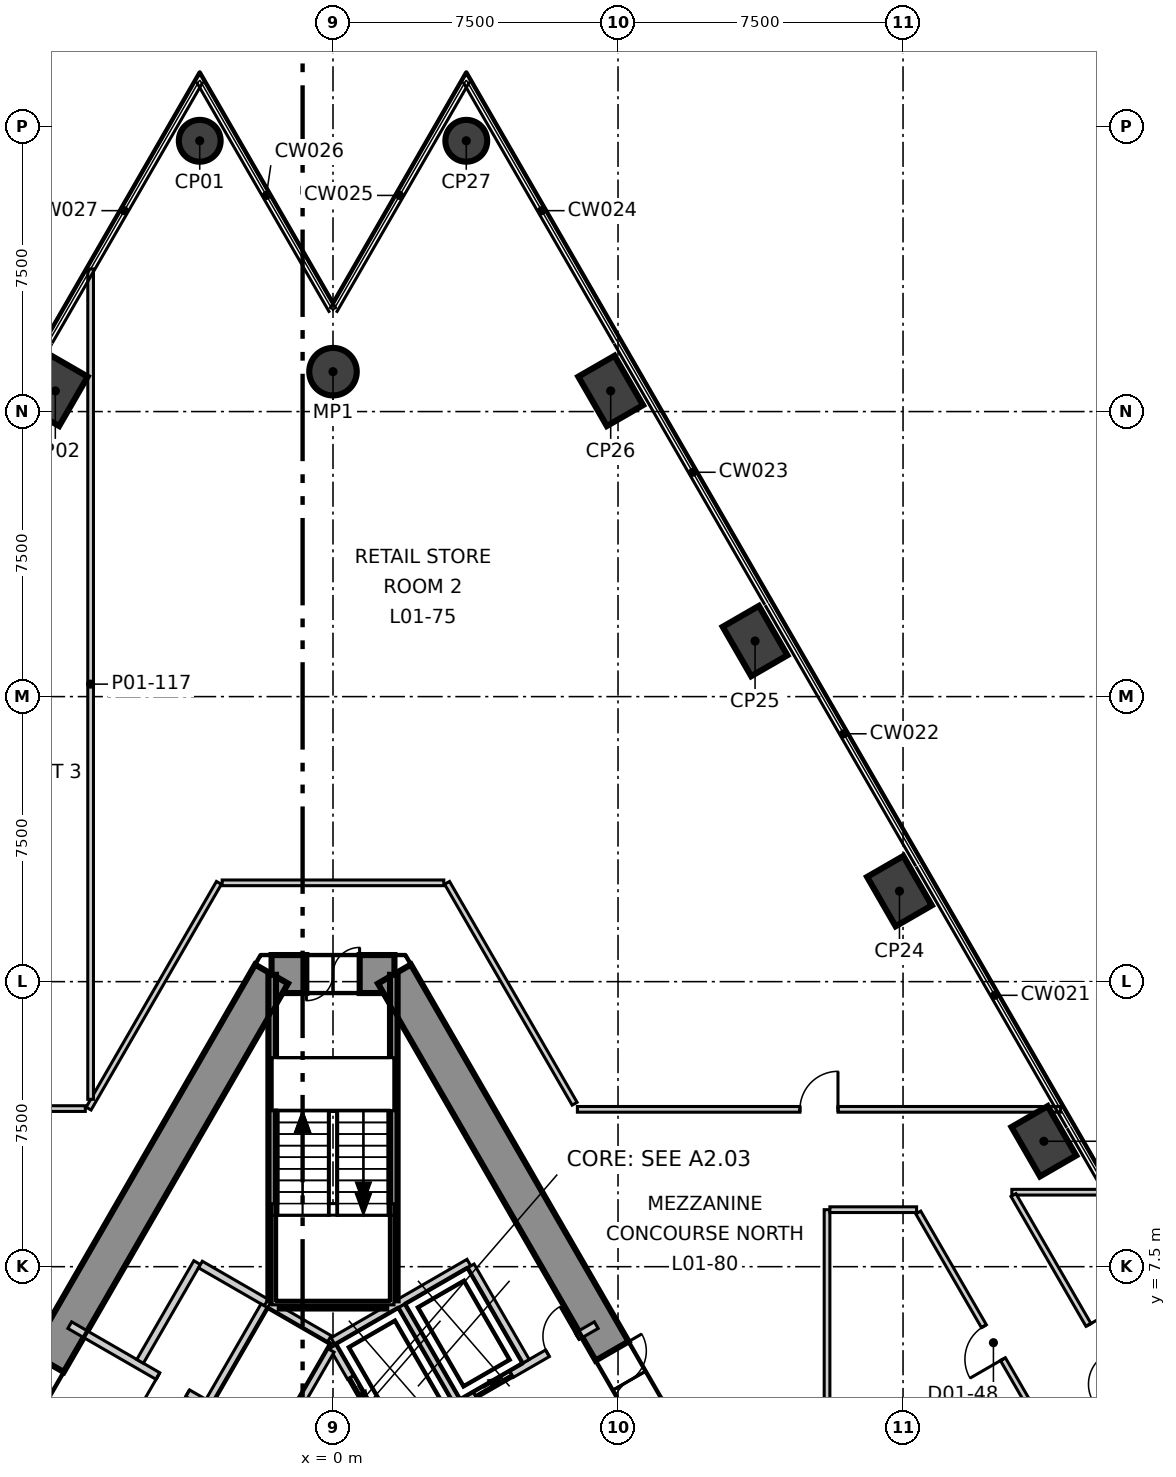
"""IFC4 building model, lengths in metres.
Left out: names, types, materials, properties, quantities, classifications, styles, units other than length and angle.
Written with IfcOpenShell. Run it as: python <this file> out.ifc"""

import sys

from ifc_helpers import new_model, si_unit, direction, frame, frame_2d, origin, origin_2d, place, context, subcontext, project, spatial, polyline, rectangle, circle, outline, extrude, element, fill, save


model = new_model("IFC4")
c1 = context("Model", 3, precision=1e-05, world=origin(), true_north=direction((0.0, 1.0)))
c2 = subcontext(c1, "Body", "Model", "MODEL_VIEW")
j1 = project(units=[si_unit("LENGTHUNIT", "METRE"), si_unit("PLANEANGLEUNIT", "RADIAN")], contexts=[c1])
p1 = place(None, origin())
s1 = spatial("IfcSite", under=j1, at=p1, CompositionType="ELEMENT")
p2 = place(p1, origin())
s2 = spatial("IfcBuilding", under=s1, at=p2, CompositionType="ELEMENT")
p3 = place(p2, frame((0.0, 0.0, 8.5)))
s3 = spatial("IfcBuildingStorey", under=s2, at=p3, CompositionType="ELEMENT", Elevation=8.5)
p4 = place(p3, frame((1.617, 15.2, -0.4), z_axis=(0.0, 0.0, 1.0), x_axis=(-1.0, 0.0, 0.0)))
e1 = element("IfcWall", 1, at=p4, inside=s3, PredefinedType="SHEAR", context=c2, shape_type="SweptSolid", body=[
    extrude(outline(polyline([(-0.288, -0.5), (1.617, -0.5), (3.522, -0.5), (2.945, 0.5), (1.617, 0.5), (0.289, 0.5), (-0.288, -0.5)])), origin(), (0.0, 0.0, 1.0), 6.0),
])
p5 = place(p4, frame((0.917, 0.0, 0.4)))
e2 = element("IfcOpeningElement", 2, at=p5, cuts=e1, PredefinedType="OPENING", context=c2, shape_type="SweptSolid", body=[
    extrude(rectangle(XDim=1.4, YDim=2.1, at=frame_2d((0.7, 1.05))), frame((0.0, 0.51, 0.0), z_axis=(0.0, -1.0, 0.0), x_axis=(1.0, 0.0, 0.0)), (0.0, 0.0, 1.0), 1.02),
])
p6 = place(p3, frame((-1.617, 15.2, -0.4), z_axis=(0.0, 0.0, 1.0), x_axis=(-0.499992141631, -0.866029940768, 0.0)))
e3 = element("IfcWall", 3, at=p6, inside=s3, PredefinedType="SHEAR", context=c2, shape_type="SweptSolid", body=[
    extrude(outline(polyline([(-0.289, -0.499), (1.656, -0.499), (3.601, -0.499), (5.547, -0.499), (7.492, -0.499), (9.437, -0.5), (11.382, -0.5), (13.328, -0.5), (15.273, -0.5), (17.218, -0.5), (19.163, -0.5), (21.109, -0.5), (23.054, -0.5), (24.999, -0.5), (24.422, 0.5), (22.566, 0.5), (20.709, 0.5), (18.853, 0.5), (16.997, 0.5), (15.14, 0.5), (13.284, 0.5), (11.427, 0.5), (9.571, 0.5), (7.715, 0.5), (5.858, 0.5), (4.002, 0.5), (2.146, 0.5), (0.289, 0.5), (-0.289, -0.499)])), origin(), (0.0, 0.0, 1.0), 6.0),
])
p7 = place(p6, frame((11.805, 0.0, 0.4)))
e4 = element("IfcOpeningElement", 4, at=p7, cuts=e3, PredefinedType="OPENING", context=c2, shape_type="SweptSolid", body=[
    extrude(rectangle(XDim=1.1, YDim=2.1, at=frame_2d((0.55, 1.05))), frame((0.0, 0.51, 0.0), z_axis=(0.0, -1.0, 0.0), x_axis=(1.0, 0.0, 0.0)), (0.0, 0.0, 1.0), 1.02),
])
p8 = place(p3, frame((13.972, -6.2, -0.4), z_axis=(0.0, 0.0, 1.0), x_axis=(-0.499992141631, 0.866029940768, 0.0)))
e5 = element("IfcWall", 5, at=p8, inside=s3, PredefinedType="SHEAR", context=c2, shape_type="SweptSolid", body=[
    extrude(outline(polyline([(-0.288, -0.5), (1.657, -0.5), (3.602, -0.5), (5.547, -0.5), (7.493, -0.5), (9.438, -0.5), (11.383, -0.5), (13.328, -0.5), (15.273, -0.5), (17.218, -0.499), (19.164, -0.499), (21.109, -0.499), (23.054, -0.499), (24.999, -0.499), (24.422, 0.5), (22.566, 0.5), (20.709, 0.5), (18.853, 0.5), (16.996, 0.5), (15.14, 0.5), (13.283, 0.5), (11.427, 0.5), (9.57, 0.5), (7.714, 0.5), (5.857, 0.5), (4.001, 0.5), (2.145, 0.5), (0.288, 0.5), (-0.288, -0.5)])), origin(), (0.0, 0.0, 1.0), 6.0),
])
p9 = place(p8, frame((11.455, 0.0, 0.4)))
e6 = element("IfcOpeningElement", 6, at=p9, cuts=e5, PredefinedType="OPENING", context=c2, shape_type="SweptSolid", body=[
    extrude(rectangle(XDim=1.8, YDim=2.1, at=frame_2d((0.9, 1.05))), frame((0.0, 0.51, 0.0), z_axis=(0.0, -1.0, 0.0), x_axis=(1.0, 0.0, 0.0)), (0.0, 0.0, 1.0), 1.02),
])
p10 = place(p3, frame((-3.507, 37.125, -0.4), z_axis=(0.0, 0.0, 1.0), x_axis=(0.5, 0.866025403784, 0.0)))
e7 = element("IfcColumn", 7, at=p10, inside=s3, PredefinedType="COLUMN", context=c2, shape_type="SweptSolid", body=[
    extrude(circle(Radius=0.55, at=origin_2d()), origin(), (0.0, 0.0, 1.0), 6.0),
])
for number, where, z_axis, x_axis in (
    (8, (-7.307, 30.544, -0.4), (0.0, 0.0, 1.0), (0.5, 0.866, 0.0)),
    (9, (18.706, 10.8, -0.4), (0.0, 0.0, 1.0), (-0.5, 0.866, 0.0)),
    (10, (14.906, 17.381, -0.4), (0.0, 0.0, 1.0), (-0.5, 0.866, 0.0)),
    (11, (11.106, 23.962, -0.4), (0.0, 0.0, 1.0), (-0.5, 0.866, 0.0)),
    (12, (7.307, 30.544, -0.4), (0.0, 0.0, 1.0), (-0.5, 0.866, 0.0)),
):
    element("IfcColumn", number, at=place(p3, frame(where, z_axis=z_axis, x_axis=x_axis)), inside=s3, PredefinedType="COLUMN", context=c2, shape_type="SweptSolid", body=[
        extrude(rectangle(XDim=1.5, YDim=1.1, at=origin_2d()), origin(), (0.0, 0.0, 1.0), 6.0),
    ])
p11 = place(p3, frame((3.507, 37.125, -0.4), z_axis=(0.0, 0.0, 1.0), x_axis=(-0.5, 0.866025403784, 0.0)))
e13 = element("IfcColumn", 13, at=p11, inside=s3, PredefinedType="COLUMN", context=c2, shape_type="SweptSolid", body=[
    extrude(circle(Radius=0.55, at=origin_2d()), origin(), (0.0, 0.0, 1.0), 6.0),
])
p12 = place(p3, frame((0.0, 31.05, -0.4), z_axis=(0.0, 0.0, 1.0), x_axis=(1.0, 0.0, 0.0)))
e14 = element("IfcColumn", 14, at=p12, inside=s3, PredefinedType="COLUMN", context=c2, shape_type="SweptSolid", body=[
    extrude(circle(Radius=0.625, at=origin_2d()), origin(), (0.0, 0.0, 1.0), 6.0),
])
p13 = place(p3, frame((17.863, 9.46, 0.0), z_axis=(0.0, 0.0, 1.0), x_axis=(1.0, 0.0, 0.0)))
e15 = element("IfcWall", 15, at=p13, inside=s3, PredefinedType="PARTITIONING", context=c2, shape_type="SweptSolid", body=[
    extrude(rectangle(XDim=2.54, YDim=0.15, at=frame_2d((1.27, 0.0))), origin(), (0.0, 0.0, 1.0), 5.6),
])
p14 = place(p3, frame((-6.431, 11.66, 0.0), z_axis=(0.0, 0.0, 1.0), x_axis=(0.499933006778, 0.866064078884, 0.0)))
e16 = element("IfcWall", 16, at=p14, inside=s3, PredefinedType="PARTITIONING", context=c2, shape_type="SweptSolid", body=[
    extrude(rectangle(XDim=6.859, YDim=0.15, at=frame_2d((3.429, 0.0))), origin(), (0.0, 0.0, 1.0), 5.6),
])
p15 = place(p3, frame((-10.6, 11.66, 0.0), z_axis=(0.0, 0.0, 1.0), x_axis=(1.0, 0.0, 0.0)))
e17 = element("IfcWall", 17, at=p15, inside=s3, PredefinedType="PARTITIONING", context=c2, shape_type="SweptSolid", body=[
    extrude(rectangle(XDim=4.082, YDim=0.15, at=frame_2d((2.041, 0.0))), origin(), (0.0, 0.0, 1.0), 5.6),
])
p16 = place(p15, frame((1.169, 0.0, 0.0)))
e18 = element("IfcOpeningElement", 18, at=p16, cuts=e17, PredefinedType="OPENING", context=c2, shape_type="SweptSolid", body=[
    extrude(rectangle(XDim=1.8, YDim=2.1, at=frame_2d((0.9, 1.05))), frame((0.0, 0.085, 0.0), z_axis=(0.0, -1.0, 0.0), x_axis=(1.0, 0.0, 0.0)), (0.0, 0.0, 1.0), 0.17),
])
p17 = place(p3, frame((-6.378, 11.904, 0.0), z_axis=(0.0, 0.0, 1.0), x_axis=(0.0, 1.0, 0.0)))
e19 = element("IfcWall", 19, at=p17, inside=s3, PredefinedType="PARTITIONING", context=c2, shape_type="SweptSolid", body=[
    extrude(rectangle(XDim=21.849, YDim=0.15, at=frame_2d((10.924, 0.0))), origin(), (0.0, 0.0, 1.0), 4.85),
])
p18 = place(p3, frame((6.431, 11.64, 0.0), z_axis=(0.0, 0.0, 1.0), x_axis=(1.0, 0.0, 0.0)))
e20 = element("IfcWall", 20, at=p18, inside=s3, PredefinedType="PARTITIONING", context=c2, shape_type="SweptSolid", body=[
    extrude(rectangle(XDim=12.714, YDim=0.15, at=frame_2d((6.357, 0.0))), origin(), (0.0, 0.0, 1.0), 5.6),
])
p19 = place(p18, frame((5.857, 0.0, 0.0)))
e21 = element("IfcOpeningElement", 21, at=p19, cuts=e20, PredefinedType="OPENING", context=c2, shape_type="SweptSolid", body=[
    extrude(rectangle(XDim=1.0, YDim=2.1, at=frame_2d((0.5, 1.05))), frame((0.0, 0.085, 0.0), z_axis=(0.0, -1.0, 0.0), x_axis=(1.0, 0.0, 0.0)), (0.0, 0.0, 1.0), 0.17),
])
p20 = place(p3, frame((3.002, 17.6, 0.0), z_axis=(0.0, 0.0, 1.0), x_axis=(0.500043638368, -0.866000207695, 0.0)))
e22 = element("IfcWall", 22, at=p20, inside=s3, PredefinedType="PARTITIONING", context=c2, shape_type="SweptSolid", body=[
    extrude(rectangle(XDim=6.711, YDim=0.15, at=frame_2d((3.356, 0.0))), origin(), (0.0, 0.0, 1.0), 5.6),
])
p21 = place(p3, frame((-2.916, 17.6, 0.0), z_axis=(0.0, 0.0, 1.0), x_axis=(1.0, 0.0, 0.0)))
e23 = element("IfcWall", 23, at=p21, inside=s3, PredefinedType="PARTITIONING", context=c2, shape_type="SweptSolid", body=[
    extrude(rectangle(XDim=5.832, YDim=0.15, at=frame_2d((2.916, 0.0))), origin(), (0.0, 0.0, 1.0), 5.6),
])
p22 = place(p3, frame((13.0, 2.0, 0.0), z_axis=(0.0, 0.0, 1.0), x_axis=(0.0, 1.0, 0.0)))
e24 = element("IfcWall", 24, at=p22, inside=s3, PredefinedType="PARTITIONING", context=c2, shape_type="SweptSolid", body=[
    extrude(rectangle(XDim=7.0, YDim=0.15, at=frame_2d((3.5, 0.0))), origin(), (0.0, 0.0, 1.0), 5.6),
])
p23 = place(p3, frame((17.906, 9.385, 0.0), z_axis=(0.0, 0.0, 1.0), x_axis=(0.500038545404, -0.866003148442, 0.0)))
e25 = element("IfcWall", 25, at=p23, inside=s3, PredefinedType="PARTITIONING", context=c2, shape_type="SweptSolid", body=[
    extrude(rectangle(XDim=11.299, YDim=0.15, at=frame_2d((5.649, 0.0))), origin(), (0.0, 0.0, 1.0), 5.6),
])
p24 = place(p23, frame((3.947, 0.0, 0.0)))
e26 = element("IfcOpeningElement", 26, at=p24, cuts=e25, PredefinedType="OPENING", context=c2, shape_type="SweptSolid", body=[
    extrude(rectangle(XDim=1.8, YDim=2.1, at=frame_2d((0.9, 1.05))), frame((0.0, 0.085, 0.0), z_axis=(0.0, -1.0, 0.0), x_axis=(1.0, 0.0, 0.0)), (0.0, 0.0, 1.0), 0.17),
])
p25 = place(p3, frame((13.075, 9.0, 0.0), z_axis=(0.0, 0.0, 1.0), x_axis=(1.0, 0.0, 0.0)))
e27 = element("IfcWall", 27, at=p25, inside=s3, PredefinedType="PARTITIONING", context=c2, shape_type="SweptSolid", body=[
    extrude(rectangle(XDim=2.282, YDim=0.15, at=frame_2d((1.141, 0.0))), origin(), (0.0, 0.0, 1.0), 5.6),
])
p26 = place(p3, frame((15.401, 8.925, 0.0), z_axis=(0.0, 0.0, 1.0), x_axis=(0.499987625769, -0.866032547932, 0.0)))
e28 = element("IfcWall", 28, at=p26, inside=s3, PredefinedType="PARTITIONING", context=c2, shape_type="SweptSolid", body=[
    extrude(rectangle(XDim=7.996, YDim=0.15, at=frame_2d((3.998, 0.0))), origin(), (0.0, 0.0, 1.0), 5.6),
])
p27 = place(p26, frame((3.455, 0.0, 0.0)))
e29 = element("IfcOpeningElement", 29, at=p27, cuts=e28, PredefinedType="OPENING", context=c2, shape_type="SweptSolid", body=[
    extrude(rectangle(XDim=1.0, YDim=2.1, at=frame_2d((0.5, 1.05))), frame((0.0, 0.085, 0.0), z_axis=(0.0, -1.0, 0.0), x_axis=(1.0, 0.0, 0.0)), (0.0, 0.0, 1.0), 0.17),
])
p28 = place(p3, frame((-0.002, 5.541, 0.0), z_axis=(0.0, 0.0, 1.0), x_axis=(0.86600155993, 0.500041296494, 0.0)))
e30 = element("IfcWall", 30, at=p28, inside=s3, PredefinedType="SOLIDWALL", context=c2, shape_type="SweptSolid", body=[
    extrude(rectangle(XDim=4.132, YDim=0.2, at=frame_2d((2.066, 0.0))), origin(), (0.0, 0.0, 1.0), 5.6),
])
p29 = place(p3, frame((0.0, 5.4, 0.0), z_axis=(0.0, 0.0, 1.0), x_axis=(0.500103862429, -0.865965430478, 0.0)))
e31 = element("IfcWall", 31, at=p29, inside=s3, PredefinedType="SOLIDWALL", context=c2, shape_type="SweptSolid", body=[
    extrude(rectangle(XDim=2.973, YDim=0.2, at=frame_2d((1.487, 0.0))), origin(), (0.0, 0.0, 1.0), 5.6),
])
p30 = place(p29, frame((0.937, 0.0, 0.0)))
e32 = element("IfcOpeningElement", 32, at=p30, cuts=e31, PredefinedType="OPENING", context=c2, shape_type="SweptSolid", body=[
    extrude(rectangle(XDim=1.1, YDim=2.1, at=frame_2d((0.55, 1.05))), frame((0.0, 0.11, 0.0), z_axis=(0.0, -1.0, 0.0), x_axis=(1.0, 0.0, 0.0)), (0.0, 0.0, 1.0), 0.22),
])
p31 = place(p3, frame((1.578, 2.874, 0.0), z_axis=(0.0, 0.0, 1.0), x_axis=(0.866055259465, 0.499948284879, 0.0)))
e33 = element("IfcWall", 33, at=p31, inside=s3, PredefinedType="SOLIDWALL", context=c2, shape_type="SweptSolid", body=[
    extrude(rectangle(XDim=6.177, YDim=0.2, at=frame_2d((3.088, 0.0))), origin(), (0.0, 0.0, 1.0), 5.6),
])
p32 = place(p31, frame((2.496, 0.0, 0.0)))
e34 = element("IfcOpeningElement", 34, at=p32, cuts=e33, PredefinedType="OPENING", context=c2, shape_type="SweptSolid", body=[
    extrude(rectangle(XDim=1.1, YDim=2.1, at=frame_2d((0.55, 1.05))), frame((0.0, 0.11, 0.0), z_axis=(0.0, -1.0, 0.0), x_axis=(1.0, 0.0, 0.0)), (0.0, 0.0, 1.0), 0.22),
])
p33 = place(p31, frame((4.696, 0.0, 0.0)))
e35 = element("IfcOpeningElement", 35, at=p33, cuts=e33, PredefinedType="OPENING", context=c2, shape_type="SweptSolid", body=[
    extrude(rectangle(XDim=0.9, YDim=2.1, at=frame_2d((0.45, 1.05))), frame((0.0, 0.11, 0.0), z_axis=(0.0, -1.0, 0.0), x_axis=(1.0, 0.0, 0.0)), (0.0, 0.0, 1.0), 0.22),
])
for number, where, z_axis, x_axis in (
    (36, (3.626, 7.52, 0.0), (0.0, 0.0, 1.0), (0.5, -0.866, 0.0)),
    (37, (1.807, 6.47, 0.0), (0.0, 0.0, 1.0), (0.5, -0.866, 0.0)),
):
    element("IfcWall", number, at=place(p3, frame(where, z_axis=z_axis, x_axis=x_axis)), inside=s3, PredefinedType="SOLIDWALL", context=c2, shape_type="SweptSolid", body=[
        extrude(rectangle(XDim=2.9, YDim=0.2, at=frame_2d((1.45, 0.0))), origin(), (0.0, 0.0, 1.0), 5.6),
    ])
p34 = place(p3, frame((-6.927, 5.962, 0.0), z_axis=(0.0, 0.0, 1.0), x_axis=(0.866065051207, -0.49993132236, 0.0)))
e38 = element("IfcWall", 38, at=p34, inside=s3, PredefinedType="SOLIDWALL", context=c2, shape_type="SweptSolid", body=[
    extrude(rectangle(XDim=4.182, YDim=0.2, at=frame_2d((2.091, 0.0))), origin(), (0.0, 0.0, 1.0), 5.6),
])
p35 = place(p34, frame((2.68, 0.0, 0.0)))
e39 = element("IfcOpeningElement", 39, at=p35, cuts=e38, PredefinedType="OPENING", context=c2, shape_type="SweptSolid", body=[
    extrude(rectangle(XDim=0.9, YDim=2.1, at=frame_2d((0.45, 1.05))), frame((0.0, 0.11, 0.0), z_axis=(0.0, -1.0, 0.0), x_axis=(1.0, 0.0, 0.0)), (0.0, 0.0, 1.0), 0.22),
])
p36 = place(p3, frame((-5.076, 5.009, 0.0), z_axis=(0.0, 0.0, 1.0), x_axis=(0.50002537861, 0.866010750942, 0.0)))
e40 = element("IfcWall", 40, at=p36, inside=s3, PredefinedType="SOLIDWALL", context=c2, shape_type="SweptSolid", body=[
    extrude(rectangle(XDim=3.0, YDim=0.2, at=frame_2d((1.5, 0.0))), origin(), (0.0, 0.0, 1.0), 5.6),
])
p37 = place(p3, frame((-3.489, 7.557, 0.0), z_axis=(0.0, 0.0, 1.0), x_axis=(0.866010750942, -0.50002537861, 0.0)))
e41 = element("IfcWall", 41, at=p37, inside=s3, PredefinedType="SOLIDWALL", context=c2, shape_type="SweptSolid", body=[
    extrude(rectangle(XDim=2.0, YDim=0.2, at=frame_2d((1.0, 0.0))), origin(), (0.0, 0.0, 1.0), 5.6),
])
p38 = place(p3, frame((-3.257, 3.959, 0.0), z_axis=(0.0, 0.0, 1.0), x_axis=(0.50012328804, 0.865954211699, 0.0)))
e42 = element("IfcWall", 42, at=p38, inside=s3, PredefinedType="SOLIDWALL", context=c2, shape_type="SweptSolid", body=[
    extrude(rectangle(XDim=2.9, YDim=0.2, at=frame_2d((1.45, 0.0))), origin(), (0.0, 0.0, 1.0), 5.6),
])
p39 = place(p3, frame((-1.67, 6.507, 0.0), z_axis=(0.0, 0.0, 1.0), x_axis=(0.865941441609, -0.500145398563, 0.0)))
e43 = element("IfcWall", 43, at=p39, inside=s3, PredefinedType="SOLIDWALL", context=c2, shape_type="SweptSolid", body=[
    extrude(rectangle(XDim=1.815, YDim=0.2, at=frame_2d((0.908, 0.0))), origin(), (0.0, 0.0, 1.0), 5.6),
])
p40 = place(p3, frame((-1.438, 2.909, 0.0), z_axis=(0.0, 0.0, 1.0), x_axis=(0.499829630636, 0.866123744241, 0.0)))
e44 = element("IfcWall", 44, at=p40, inside=s3, PredefinedType="SOLIDWALL", context=c2, shape_type="SweptSolid", body=[
    extrude(rectangle(XDim=2.761, YDim=0.2, at=frame_2d((1.38, 0.0))), origin(), (0.0, 0.0, 1.0), 5.6),
])
p41 = place(p3, frame((1.6, 6.615, 0.0), z_axis=(0.0, 0.0, 1.0), x_axis=(0.0, 1.0, 0.0)))
e45 = element("IfcWall", 45, at=p41, inside=s3, PredefinedType="SOLIDWALL", context=c2, shape_type="SweptSolid", body=[
    extrude(rectangle(XDim=8.565, YDim=0.2, at=frame_2d((4.282, 0.0))), origin(), (0.0, 0.0, 1.0), 5.6),
])
p42 = place(p3, frame((-1.4, 6.5, 0.0), z_axis=(0.0, 0.0, 1.0), x_axis=(1.0, 0.0, 0.0)))
e46 = element("IfcWall", 46, at=p42, inside=s3, PredefinedType="SOLIDWALL", context=c2, shape_type="SweptSolid", body=[
    extrude(rectangle(XDim=2.8, YDim=0.2, at=frame_2d((1.4, 0.0))), origin(), (0.0, 0.0, 1.0), 5.6),
])
p43 = place(p3, frame((-1.6, 6.615, 0.0), z_axis=(0.0, 0.0, 1.0), x_axis=(0.0, 1.0, 0.0)))
e47 = element("IfcWall", 47, at=p43, inside=s3, PredefinedType="SOLIDWALL", context=c2, shape_type="SweptSolid", body=[
    extrude(rectangle(XDim=8.565, YDim=0.2, at=frame_2d((4.282, 0.0))), origin(), (0.0, 0.0, 1.0), 5.6),
])
p44 = place(p30, origin())
e48 = element("IfcDoor", 48, at=p44, inside=s3, OperationType="SLIDING_TO_LEFT", PredefinedType="DOOR", context=c2, shape_type="SweptSolid", body=[
    extrude(rectangle(XDim=1.1, YDim=2.1, at=frame_2d((0.55, 1.05))), frame((0.0, 0.025, 0.0), z_axis=(0.0, -1.0, 0.0), x_axis=(1.0, 0.0, 0.0)), (0.0, 0.0, 1.0), 0.05),
])
fill(e32, e48)
p45 = place(p32, origin())
e49 = element("IfcDoor", 49, at=p45, inside=s3, OperationType="SLIDING_TO_LEFT", PredefinedType="DOOR", context=c2, shape_type="SweptSolid", body=[
    extrude(rectangle(XDim=1.1, YDim=2.1, at=frame_2d((0.55, 1.05))), frame((0.0, 0.025, 0.0), z_axis=(0.0, -1.0, 0.0), x_axis=(1.0, 0.0, 0.0)), (0.0, 0.0, 1.0), 0.05),
])
fill(e34, e49)
p46 = place(p35, origin())
e50 = element("IfcDoor", 50, at=p46, inside=s3, OperationType="SINGLE_SWING_LEFT", PredefinedType="DOOR", context=c2, shape_type="SweptSolid", body=[
    extrude(rectangle(XDim=0.9, YDim=2.1, at=frame_2d((0.45, 1.05))), frame((0.0, 0.025, 0.0), z_axis=(0.0, -1.0, 0.0), x_axis=(1.0, 0.0, 0.0)), (0.0, 0.0, 1.0), 0.05),
])
fill(e39, e50)
p47 = place(p27, origin())
e51 = element("IfcDoor", 51, at=p47, inside=s3, OperationType="SINGLE_SWING_RIGHT", PredefinedType="DOOR", context=c2, shape_type="SweptSolid", body=[
    extrude(rectangle(XDim=1.0, YDim=2.1, at=frame_2d((0.5, 1.05))), frame((0.0, 0.025, 0.0), z_axis=(0.0, -1.0, 0.0), x_axis=(1.0, 0.0, 0.0)), (0.0, 0.0, 1.0), 0.05),
])
fill(e29, e51)
p48 = place(p19, origin())
e52 = element("IfcDoor", 52, at=p48, inside=s3, OperationType="SINGLE_SWING_LEFT", PredefinedType="DOOR", context=c2, shape_type="SweptSolid", body=[
    extrude(rectangle(XDim=1.0, YDim=2.1, at=frame_2d((0.5, 1.05))), frame((0.0, 0.025, 0.0), z_axis=(0.0, -1.0, 0.0), x_axis=(1.0, 0.0, 0.0)), (0.0, 0.0, 1.0), 0.05),
])
fill(e21, e52)
p49 = place(p24, origin())
e53 = element("IfcDoor", 53, at=p49, inside=s3, OperationType="DOUBLE_DOOR_SINGLE_SWING", PredefinedType="DOOR", context=c2, shape_type="SweptSolid", body=[
    extrude(rectangle(XDim=1.8, YDim=2.1, at=frame_2d((0.9, 1.05))), frame((0.0, 0.025, 0.0), z_axis=(0.0, -1.0, 0.0), x_axis=(1.0, 0.0, 0.0)), (0.0, 0.0, 1.0), 0.05),
])
fill(e26, e53)
p50 = place(p9, origin())
e54 = element("IfcDoor", 54, at=p50, inside=s3, OperationType="DOUBLE_DOOR_SINGLE_SWING", PredefinedType="DOOR", context=c2, shape_type="SweptSolid", body=[
    extrude(rectangle(XDim=1.8, YDim=2.1, at=frame_2d((0.9, 1.05))), frame((0.0, 0.025, 0.0), z_axis=(0.0, -1.0, 0.0), x_axis=(1.0, 0.0, 0.0)), (0.0, 0.0, 1.0), 0.05),
])
fill(e6, e54)
p51 = place(p5, origin())
e55 = element("IfcDoor", 55, at=p51, inside=s3, OperationType="DOUBLE_DOOR_SINGLE_SWING", PredefinedType="DOOR", context=c2, shape_type="SweptSolid", body=[
    extrude(rectangle(XDim=1.4, YDim=2.1, at=frame_2d((0.7, 1.05))), frame((0.0, 0.025, 0.0), z_axis=(0.0, -1.0, 0.0), x_axis=(1.0, 0.0, 0.0)), (0.0, 0.0, 1.0), 0.05),
])
fill(e2, e55)
p52 = place(p33, origin())
e56 = element("IfcDoor", 56, at=p52, inside=s3, OperationType="SINGLE_SWING_LEFT", PredefinedType="DOOR", context=c2, shape_type="SweptSolid", body=[
    extrude(rectangle(XDim=0.9, YDim=2.1, at=frame_2d((0.45, 1.05))), frame((0.0, 0.025, 0.0), z_axis=(0.0, -1.0, 0.0), x_axis=(1.0, 0.0, 0.0)), (0.0, 0.0, 1.0), 0.05),
])
fill(e35, e56)
save(model, sys.argv[1])
